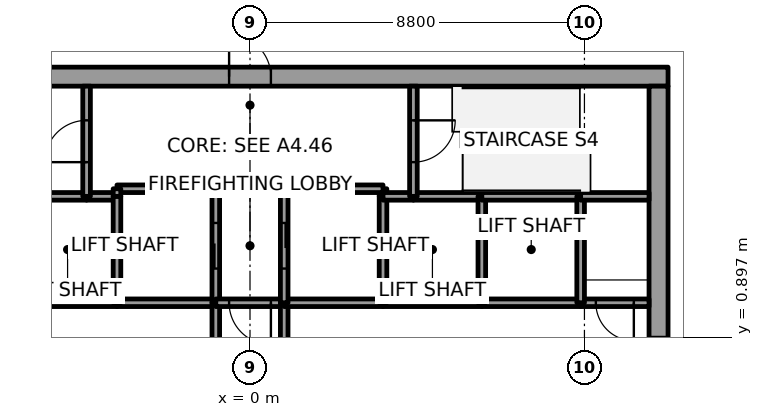
"""IFC4 building model, lengths in metres.
Left out: names, types, materials, properties, quantities, classifications, styles, units other than length and angle.
Written with IfcOpenShell. Run it as: python <this file> out.ifc"""

import sys

from ifc_helpers import new_model, si_unit, direction, frame, frame_2d, origin, place, context, subcontext, project, spatial, rectangle, extrude, element, fill, save


model = new_model("IFC4")
c1 = context("Model", 3, precision=1e-05, world=origin(), true_north=direction((0.0, 1.0)))
c2 = subcontext(c1, "Body", "Model", "MODEL_VIEW")
j1 = project(units=[si_unit("LENGTHUNIT", "METRE"), si_unit("PLANEANGLEUNIT", "RADIAN")], contexts=[c1])
p1 = place(None, origin())
s1 = spatial("IfcSite", under=j1, at=p1, CompositionType="ELEMENT")
p2 = place(p1, origin())
s2 = spatial("IfcBuilding", under=s1, at=p2, CompositionType="ELEMENT")
p3 = place(p2, frame((0.0, 0.0, 197.8)))
s3 = spatial("IfcBuildingStorey", under=s2, at=p3, CompositionType="ELEMENT", Elevation=197.8)
p4 = place(p3, frame((-11.0, 7.75, 0.0), z_axis=(0.0, 0.0, 1.0), x_axis=(1.0, 0.0, 0.0)))
e1 = element("IfcWall", 1, at=p4, inside=s3, PredefinedType="SHEAR", context=c2, shape_type="SweptSolid", body=[
    extrude(rectangle(XDim=22.0, YDim=0.5, at=frame_2d((11.0, 0.0))), origin(), (0.0, 0.0, 1.0), 4.0),
])
p5 = place(p4, frame((10.45, 0.0, 0.0)))
e2 = element("IfcOpeningElement", 2, at=p5, cuts=e1, PredefinedType="OPENING", context=c2, shape_type="SweptSolid", body=[
    extrude(rectangle(XDim=1.1, YDim=2.1, at=frame_2d((0.55, 1.05))), frame((0.0, 0.25, 0.0), z_axis=(0.0, -1.0, 0.0), x_axis=(1.0, 0.0, 0.0)), (0.0, 0.0, 1.0), 0.5),
])
p6 = place(p3, frame((10.75, -7.5, 0.0), z_axis=(0.0, 0.0, 1.0), x_axis=(0.0, 1.0, 0.0)))
e3 = element("IfcWall", 3, at=p6, inside=s3, PredefinedType="SHEAR", context=c2, shape_type="SweptSolid", body=[
    extrude(rectangle(XDim=15.0, YDim=0.5, at=frame_2d((7.5, 0.0))), origin(), (0.0, 0.0, 1.0), 4.0),
])
p7 = place(p6, frame((6.6, 0.0, 0.0)))
e4 = element("IfcOpeningElement", 4, at=p7, cuts=e3, PredefinedType="OPENING", context=c2, shape_type="SweptSolid", body=[
    extrude(rectangle(XDim=1.8, YDim=2.1, at=frame_2d((0.9, 1.05))), frame((0.0, 0.25, 0.0), z_axis=(0.0, -1.0, 0.0), x_axis=(1.0, 0.0, 0.0)), (0.0, 0.0, 1.0), 0.5),
])
p8 = place(p3, frame((-3.5, 1.8, 0.0), z_axis=(0.0, 0.0, 1.0), x_axis=(-1.0, 0.0, 0.0)))
e5 = element("IfcWall", 5, at=p8, inside=s3, PredefinedType="SOLIDWALL", context=c2, shape_type="SweptSolid", body=[
    extrude(rectangle(XDim=2.6, YDim=0.2, at=frame_2d((1.3, 0.0))), origin(), (0.0, 0.0, 1.0), 3.85),
])
p9 = place(p3, frame((-4.3, 4.6, 0.0), z_axis=(0.0, 0.0, 1.0), x_axis=(-1.0, 0.0, 0.0)))
e6 = element("IfcWall", 6, at=p9, inside=s3, PredefinedType="SOLIDWALL", context=c2, shape_type="SweptSolid", body=[
    extrude(rectangle(XDim=1.8, YDim=0.2, at=frame_2d((0.9, 0.0))), origin(), (0.0, 0.0, 1.0), 3.85),
])
p10 = place(p3, frame((-3.5, 4.6, 0.0), z_axis=(0.0, 0.0, 1.0), x_axis=(-1.0, 0.0, 0.0)))
e7 = element("IfcWall", 7, at=p10, inside=s3, PredefinedType="SOLIDWALL", context=c2, shape_type="SweptSolid", body=[
    extrude(rectangle(XDim=0.8, YDim=0.2, at=frame_2d((0.4, 0.0))), origin(), (0.0, 0.0, 1.0), 3.85),
])
p11 = place(p3, frame((-4.3, 4.6, 0.0), z_axis=(0.0, 0.0, 1.0), x_axis=(0.0, 1.0, 0.0)))
e8 = element("IfcWall", 8, at=p11, inside=s3, PredefinedType="SOLIDWALL", context=c2, shape_type="SweptSolid", body=[
    extrude(rectangle(XDim=2.9, YDim=0.2, at=frame_2d((1.45, 0.0))), origin(), (0.0, 0.0, 1.0), 3.85),
])
p12 = place(p11, frame((0.9, 0.0, 0.0)))
e9 = element("IfcOpeningElement", 9, at=p12, cuts=e8, PredefinedType="OPENING", context=c2, shape_type="SweptSolid", body=[
    extrude(rectangle(XDim=1.1, YDim=2.1, at=frame_2d((0.55, 1.05))), frame((0.0, 0.1, 0.0), z_axis=(0.0, -1.0, 0.0), x_axis=(1.0, 0.0, 0.0)), (0.0, 0.0, 1.0), 0.2),
])
p13 = place(p3, frame((-0.9, 1.8, 0.0), z_axis=(0.0, 0.0, 1.0), x_axis=(-1.0, 0.0, 0.0)))
e10 = element("IfcWall", 10, at=p13, inside=s3, PredefinedType="SOLIDWALL", context=c2, shape_type="SweptSolid", body=[
    extrude(rectangle(XDim=2.6, YDim=0.2, at=frame_2d((1.3, 0.0))), origin(), (0.0, 0.0, 1.0), 3.85),
])
p14 = place(p3, frame((-3.5, 4.6, 0.0), z_axis=(0.0, 0.0, 1.0), x_axis=(0.0, -1.0, 0.0)))
e11 = element("IfcWall", 11, at=p14, inside=s3, PredefinedType="SOLIDWALL", context=c2, shape_type="SweptSolid", body=[
    extrude(rectangle(XDim=2.8, YDim=0.2, at=frame_2d((1.4, 0.0))), origin(), (0.0, 0.0, 1.0), 3.85),
])
p15 = place(p3, frame((-0.9, 1.8, 0.0), z_axis=(0.0, 0.0, 1.0), x_axis=(0.0, 1.0, 0.0)))
e12 = element("IfcWall", 12, at=p15, inside=s3, PredefinedType="SOLIDWALL", context=c2, shape_type="SweptSolid", body=[
    extrude(rectangle(XDim=3.0, YDim=0.2, at=frame_2d((1.5, 0.0))), origin(), (0.0, 0.0, 1.0), 3.85),
])
p16 = place(p15, frame((0.9, 0.0, 0.0)))
e13 = element("IfcOpeningElement", 13, at=p16, cuts=e12, PredefinedType="OPENING", context=c2, shape_type="SweptSolid", body=[
    extrude(rectangle(XDim=1.2, YDim=2.1, at=frame_2d((0.6, 1.05))), frame((0.0, 0.1, 0.0), z_axis=(0.0, -1.0, 0.0), x_axis=(1.0, 0.0, 0.0)), (0.0, 0.0, 1.0), 0.2),
])
p17 = place(p3, frame((-0.9, 4.8, 0.0), z_axis=(0.0, 0.0, 1.0), x_axis=(-1.0, 0.0, 0.0)))
e14 = element("IfcWall", 14, at=p17, inside=s3, PredefinedType="SOLIDWALL", context=c2, shape_type="SweptSolid", body=[
    extrude(rectangle(XDim=2.6, YDim=0.2, at=frame_2d((1.3, 0.0))), origin(), (0.0, 0.0, 1.0), 3.85),
])
p18 = place(p3, frame((-3.5, 4.8, 0.0), z_axis=(0.0, 0.0, 1.0), x_axis=(0.0, -1.0, 0.0)))
e15 = element("IfcWall", 15, at=p18, inside=s3, PredefinedType="SOLIDWALL", context=c2, shape_type="SweptSolid", body=[
    extrude(rectangle(XDim=0.2, YDim=0.2, at=frame_2d((0.1, 0.0))), origin(), (0.0, 0.0, 1.0), 3.85),
])
p19 = place(p3, frame((-0.9, 1.8, 0.0), z_axis=(0.0, 0.0, 1.0), x_axis=(0.0, -1.0, 0.0)))
e16 = element("IfcWall", 16, at=p19, inside=s3, PredefinedType="SOLIDWALL", context=c2, shape_type="SweptSolid", body=[
    extrude(rectangle(XDim=3.6, YDim=0.2, at=frame_2d((1.8, 0.0))), origin(), (0.0, 0.0, 1.0), 3.85),
])
p20 = place(p19, frame((1.05, 0.0, 0.0)))
e17 = element("IfcOpeningElement", 17, at=p20, cuts=e16, PredefinedType="OPENING", context=c2, shape_type="SweptSolid", body=[
    extrude(rectangle(XDim=1.5, YDim=2.1, at=frame_2d((0.75, 1.05))), frame((0.0, 0.1, 0.0), z_axis=(0.0, -1.0, 0.0), x_axis=(1.0, 0.0, 0.0)), (0.0, 0.0, 1.0), 0.2),
])
p21 = place(p3, frame((0.9, 1.8, 0.0), z_axis=(0.0, 0.0, 1.0), x_axis=(-1.0, 0.0, 0.0)))
e18 = element("IfcWall", 18, at=p21, inside=s3, PredefinedType="SOLIDWALL", context=c2, shape_type="SweptSolid", body=[
    extrude(rectangle(XDim=1.8, YDim=0.2, at=frame_2d((0.9, 0.0))), origin(), (0.0, 0.0, 1.0), 3.85),
])
p22 = place(p21, frame((0.35, 0.0, 0.0)))
e19 = element("IfcOpeningElement", 19, at=p22, cuts=e18, PredefinedType="OPENING", context=c2, shape_type="SweptSolid", body=[
    extrude(rectangle(XDim=1.1, YDim=2.1, at=frame_2d((0.55, 1.05))), frame((0.0, 0.1, 0.0), z_axis=(0.0, -1.0, 0.0), x_axis=(1.0, 0.0, 0.0)), (0.0, 0.0, 1.0), 0.2),
])
p23 = place(p3, frame((0.9, -1.8, 0.0), z_axis=(0.0, 0.0, 1.0), x_axis=(0.0, 1.0, 0.0)))
e20 = element("IfcWall", 20, at=p23, inside=s3, PredefinedType="SOLIDWALL", context=c2, shape_type="SweptSolid", body=[
    extrude(rectangle(XDim=3.6, YDim=0.2, at=frame_2d((1.8, 0.0))), origin(), (0.0, 0.0, 1.0), 3.85),
])
p24 = place(p23, frame((1.05, 0.0, 0.0)))
e21 = element("IfcOpeningElement", 21, at=p24, cuts=e20, PredefinedType="OPENING", context=c2, shape_type="SweptSolid", body=[
    extrude(rectangle(XDim=1.5, YDim=2.1, at=frame_2d((0.75, 1.05))), frame((0.0, 0.1, 0.0), z_axis=(0.0, -1.0, 0.0), x_axis=(1.0, 0.0, 0.0)), (0.0, 0.0, 1.0), 0.2),
])
p25 = place(p3, frame((3.5, 1.8, 0.0), z_axis=(0.0, 0.0, 1.0), x_axis=(-1.0, 0.0, 0.0)))
e22 = element("IfcWall", 22, at=p25, inside=s3, PredefinedType="SOLIDWALL", context=c2, shape_type="SweptSolid", body=[
    extrude(rectangle(XDim=2.6, YDim=0.2, at=frame_2d((1.3, 0.0))), origin(), (0.0, 0.0, 1.0), 3.85),
])
p26 = place(p3, frame((3.5, 4.6, 0.0), z_axis=(0.0, 0.0, 1.0), x_axis=(0.0, 1.0, 0.0)))
e23 = element("IfcWall", 23, at=p26, inside=s3, PredefinedType="SOLIDWALL", context=c2, shape_type="SweptSolid", body=[
    extrude(rectangle(XDim=0.2, YDim=0.2, at=frame_2d((0.1, 0.0))), origin(), (0.0, 0.0, 1.0), 3.85),
])
p27 = place(p3, frame((3.5, 4.8, 0.0), z_axis=(0.0, 0.0, 1.0), x_axis=(-1.0, 0.0, 0.0)))
e24 = element("IfcWall", 24, at=p27, inside=s3, PredefinedType="SOLIDWALL", context=c2, shape_type="SweptSolid", body=[
    extrude(rectangle(XDim=2.6, YDim=0.2, at=frame_2d((1.3, 0.0))), origin(), (0.0, 0.0, 1.0), 3.85),
])
p28 = place(p3, frame((0.9, 4.8, 0.0), z_axis=(0.0, 0.0, 1.0), x_axis=(0.0, -1.0, 0.0)))
e25 = element("IfcWall", 25, at=p28, inside=s3, PredefinedType="SOLIDWALL", context=c2, shape_type="SweptSolid", body=[
    extrude(rectangle(XDim=3.0, YDim=0.2, at=frame_2d((1.5, 0.0))), origin(), (0.0, 0.0, 1.0), 3.85),
])
p29 = place(p28, frame((0.9, 0.0, 0.0)))
e26 = element("IfcOpeningElement", 26, at=p29, cuts=e25, PredefinedType="OPENING", context=c2, shape_type="SweptSolid", body=[
    extrude(rectangle(XDim=1.2, YDim=2.1, at=frame_2d((0.6, 1.05))), frame((0.0, 0.1, 0.0), z_axis=(0.0, -1.0, 0.0), x_axis=(1.0, 0.0, 0.0)), (0.0, 0.0, 1.0), 0.2),
])
p30 = place(p3, frame((6.1, 1.8, 0.0), z_axis=(0.0, 0.0, 1.0), x_axis=(-1.0, 0.0, 0.0)))
e27 = element("IfcWall", 27, at=p30, inside=s3, PredefinedType="SOLIDWALL", context=c2, shape_type="SweptSolid", body=[
    extrude(rectangle(XDim=2.6, YDim=0.2, at=frame_2d((1.3, 0.0))), origin(), (0.0, 0.0, 1.0), 3.85),
])
p31 = place(p3, frame((3.5, 1.8, 0.0), z_axis=(0.0, 0.0, 1.0), x_axis=(0.0, 1.0, 0.0)))
e28 = element("IfcWall", 28, at=p31, inside=s3, PredefinedType="SOLIDWALL", context=c2, shape_type="SweptSolid", body=[
    extrude(rectangle(XDim=2.8, YDim=0.2, at=frame_2d((1.4, 0.0))), origin(), (0.0, 0.0, 1.0), 3.85),
])
p32 = place(p3, frame((4.3, 4.6, 0.0), z_axis=(0.0, 0.0, 1.0), x_axis=(-1.0, 0.0, 0.0)))
e29 = element("IfcWall", 29, at=p32, inside=s3, PredefinedType="SOLIDWALL", context=c2, shape_type="SweptSolid", body=[
    extrude(rectangle(XDim=0.8, YDim=0.2, at=frame_2d((0.4, 0.0))), origin(), (0.0, 0.0, 1.0), 3.85),
])
p33 = place(p3, frame((6.1, 4.6, 0.0), z_axis=(0.0, 0.0, 1.0), x_axis=(-1.0, 0.0, 0.0)))
e30 = element("IfcWall", 30, at=p33, inside=s3, PredefinedType="SOLIDWALL", context=c2, shape_type="SweptSolid", body=[
    extrude(rectangle(XDim=1.8, YDim=0.2, at=frame_2d((0.9, 0.0))), origin(), (0.0, 0.0, 1.0), 3.85),
])
p34 = place(p3, frame((4.3, 7.5, 0.0), z_axis=(0.0, 0.0, 1.0), x_axis=(0.0, -1.0, 0.0)))
e31 = element("IfcWall", 31, at=p34, inside=s3, PredefinedType="SOLIDWALL", context=c2, shape_type="SweptSolid", body=[
    extrude(rectangle(XDim=2.9, YDim=0.2, at=frame_2d((1.45, 0.0))), origin(), (0.0, 0.0, 1.0), 3.85),
])
p35 = place(p34, frame((0.9, 0.0, 0.0)))
e32 = element("IfcOpeningElement", 32, at=p35, cuts=e31, PredefinedType="OPENING", context=c2, shape_type="SweptSolid", body=[
    extrude(rectangle(XDim=1.1, YDim=2.1, at=frame_2d((0.55, 1.05))), frame((0.0, 0.1, 0.0), z_axis=(0.0, -1.0, 0.0), x_axis=(1.0, 0.0, 0.0)), (0.0, 0.0, 1.0), 0.2),
])
p36 = place(p3, frame((8.7, 1.8, 0.0), z_axis=(0.0, 0.0, 1.0), x_axis=(-1.0, 0.0, 0.0)))
e33 = element("IfcWall", 33, at=p36, inside=s3, PredefinedType="SOLIDWALL", context=c2, shape_type="SweptSolid", body=[
    extrude(rectangle(XDim=2.6, YDim=0.2, at=frame_2d((1.3, 0.0))), origin(), (0.0, 0.0, 1.0), 3.85),
])
p37 = place(p3, frame((6.1, 1.8, 0.0), z_axis=(0.0, 0.0, 1.0), x_axis=(0.0, 1.0, 0.0)))
e34 = element("IfcWall", 34, at=p37, inside=s3, PredefinedType="SOLIDWALL", context=c2, shape_type="SweptSolid", body=[
    extrude(rectangle(XDim=2.8, YDim=0.2, at=frame_2d((1.4, 0.0))), origin(), (0.0, 0.0, 1.0), 3.85),
])
p38 = place(p3, frame((8.7, 4.6, 0.0), z_axis=(0.0, 0.0, 1.0), x_axis=(-1.0, 0.0, 0.0)))
e35 = element("IfcWall", 35, at=p38, inside=s3, PredefinedType="SOLIDWALL", context=c2, shape_type="SweptSolid", body=[
    extrude(rectangle(XDim=2.6, YDim=0.2, at=frame_2d((1.3, 0.0))), origin(), (0.0, 0.0, 1.0), 3.85),
])
p39 = place(p3, frame((10.5, 1.8, 0.0), z_axis=(0.0, 0.0, 1.0), x_axis=(-1.0, 0.0, 0.0)))
e36 = element("IfcWall", 36, at=p39, inside=s3, PredefinedType="SOLIDWALL", context=c2, shape_type="SweptSolid", body=[
    extrude(rectangle(XDim=1.8, YDim=0.2, at=frame_2d((0.9, 0.0))), origin(), (0.0, 0.0, 1.0), 3.85),
])
p40 = place(p39, frame((0.4, 0.0, 0.0)))
e37 = element("IfcOpeningElement", 37, at=p40, cuts=e36, PredefinedType="OPENING", context=c2, shape_type="SweptSolid", body=[
    extrude(rectangle(XDim=1.0, YDim=2.1, at=frame_2d((0.5, 1.05))), frame((0.0, 0.1, 0.0), z_axis=(0.0, -1.0, 0.0), x_axis=(1.0, 0.0, 0.0)), (0.0, 0.0, 1.0), 0.2),
])
p41 = place(p3, frame((8.7, 4.6, 0.0), z_axis=(0.0, 0.0, 1.0), x_axis=(0.0, -1.0, 0.0)))
e38 = element("IfcWall", 38, at=p41, inside=s3, PredefinedType="SOLIDWALL", context=c2, shape_type="SweptSolid", body=[
    extrude(rectangle(XDim=2.8, YDim=0.2, at=frame_2d((1.4, 0.0))), origin(), (0.0, 0.0, 1.0), 3.85),
])
p42 = place(p3, frame((10.5, 4.6, 0.0), z_axis=(0.0, 0.0, 1.0), x_axis=(-1.0, 0.0, 0.0)))
e39 = element("IfcWall", 39, at=p42, inside=s3, PredefinedType="SOLIDWALL", context=c2, shape_type="SweptSolid", body=[
    extrude(rectangle(XDim=1.8, YDim=0.2, at=frame_2d((0.9, 0.0))), origin(), (0.0, 0.0, 1.0), 3.85),
])
p43 = place(p16, origin())
e40 = element("IfcDoor", 40, at=p43, inside=s3, OperationType="SLIDING_TO_LEFT", PredefinedType="DOOR", context=c2, shape_type="SweptSolid", body=[
    extrude(rectangle(XDim=1.2, YDim=2.1, at=frame_2d((0.6, 1.05))), frame((0.0, 0.025, 0.0), z_axis=(0.0, -1.0, 0.0), x_axis=(1.0, 0.0, 0.0)), (0.0, 0.0, 1.0), 0.05),
])
fill(e13, e40)
p44 = place(p29, origin())
e41 = element("IfcDoor", 41, at=p44, inside=s3, OperationType="SLIDING_TO_LEFT", PredefinedType="DOOR", context=c2, shape_type="SweptSolid", body=[
    extrude(rectangle(XDim=1.2, YDim=2.1, at=frame_2d((0.6, 1.05))), frame((0.0, 0.025, 0.0), z_axis=(0.0, -1.0, 0.0), x_axis=(1.0, 0.0, 0.0)), (0.0, 0.0, 1.0), 0.05),
])
fill(e26, e41)
p45 = place(p22, origin())
e42 = element("IfcDoor", 42, at=p45, inside=s3, OperationType="SINGLE_SWING_LEFT", PredefinedType="DOOR", context=c2, shape_type="SweptSolid", body=[
    extrude(rectangle(XDim=1.1, YDim=2.1, at=frame_2d((0.55, 1.05))), frame((0.0, 0.025, 0.0), z_axis=(0.0, -1.0, 0.0), x_axis=(1.0, 0.0, 0.0)), (0.0, 0.0, 1.0), 0.05),
])
fill(e19, e42)
p46 = place(p40, origin())
e43 = element("IfcDoor", 43, at=p46, inside=s3, OperationType="SINGLE_SWING_LEFT", PredefinedType="DOOR", context=c2, shape_type="SweptSolid", body=[
    extrude(rectangle(XDim=1.0, YDim=2.1, at=frame_2d((0.5, 1.05))), frame((0.0, 0.025, 0.0), z_axis=(0.0, -1.0, 0.0), x_axis=(1.0, 0.0, 0.0)), (0.0, 0.0, 1.0), 0.05),
])
fill(e37, e43)
p47 = place(p12, origin())
e44 = element("IfcDoor", 44, at=p47, inside=s3, OperationType="SINGLE_SWING_RIGHT", PredefinedType="DOOR", context=c2, shape_type="SweptSolid", body=[
    extrude(rectangle(XDim=1.1, YDim=2.1, at=frame_2d((0.55, 1.05))), frame((0.0, 0.025, 0.0), z_axis=(0.0, -1.0, 0.0), x_axis=(1.0, 0.0, 0.0)), (0.0, 0.0, 1.0), 0.05),
])
fill(e9, e44)
p48 = place(p35, origin())
e45 = element("IfcDoor", 45, at=p48, inside=s3, OperationType="SINGLE_SWING_LEFT", PredefinedType="DOOR", context=c2, shape_type="SweptSolid", body=[
    extrude(rectangle(XDim=1.1, YDim=2.1, at=frame_2d((0.55, 1.05))), frame((0.0, 0.025, 0.0), z_axis=(0.0, -1.0, 0.0), x_axis=(1.0, 0.0, 0.0)), (0.0, 0.0, 1.0), 0.05),
])
fill(e32, e45)
p49 = place(p7, origin())
e46 = element("IfcDoor", 46, at=p49, inside=s3, OperationType="DOUBLE_DOOR_SINGLE_SWING", PredefinedType="DOOR", context=c2, shape_type="SweptSolid", body=[
    extrude(rectangle(XDim=1.8, YDim=2.1, at=frame_2d((0.9, 1.05))), frame((0.0, 0.025, 0.0), z_axis=(0.0, -1.0, 0.0), x_axis=(1.0, 0.0, 0.0)), (0.0, 0.0, 1.0), 0.05),
])
fill(e4, e46)
p50 = place(p5, origin())
e47 = element("IfcDoor", 47, at=p50, inside=s3, OperationType="SINGLE_SWING_RIGHT", PredefinedType="DOOR", context=c2, shape_type="SweptSolid", body=[
    extrude(rectangle(XDim=1.1, YDim=2.1, at=frame_2d((0.55, 1.05))), frame((0.0, 0.025, 0.0), z_axis=(0.0, -1.0, 0.0), x_axis=(1.0, 0.0, 0.0)), (0.0, 0.0, 1.0), 0.05),
])
fill(e2, e47)
save(model, sys.argv[1])
